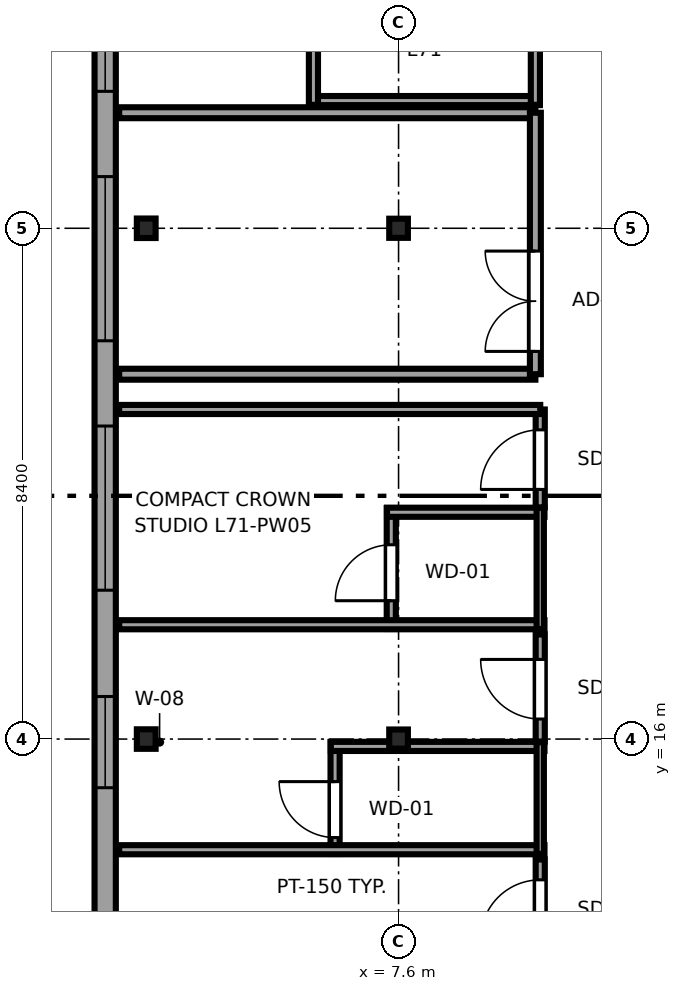
"""IFC4 building model, lengths in metres.
Left out: names, types, materials, properties, quantities, classifications, styles, units other than length and angle.
Written with IfcOpenShell. Run it as: python <this file> out.ifc"""

import sys

from ifc_helpers import new_model, si_unit, direction, frame, frame_2d, origin, origin_2d, place, context, subcontext, project, spatial, rectangle, i_section, extrude, source, transform, mapped, element, fill, save


model = new_model("IFC4")
c1 = context("Model", 3, precision=1e-05, world=origin(), true_north=direction((0.0, 1.0)))
c2 = subcontext(c1, "Body", "Model", "MODEL_VIEW")
j1 = project(units=[si_unit("LENGTHUNIT", "METRE"), si_unit("PLANEANGLEUNIT", "RADIAN")], contexts=[c1])
p1 = place(None, origin())
s1 = spatial("IfcSite", under=j1, at=p1, CompositionType="ELEMENT")
p2 = place(p1, origin())
s2 = spatial("IfcBuilding", under=s1, at=p2, CompositionType="ELEMENT")
p3 = place(p2, frame((0.0, 0.0, 266.5)))
s3 = spatial("IfcBuildingStorey", under=s2, at=p3, CompositionType="ELEMENT", Elevation=266.5)
m1 = source(origin(), c2, "Body", "SweptSolid", [
    extrude(i_section(OverallWidth=0.309, OverallDepth=0.321, WebThickness=0.014, FlangeThickness=0.022, FilletRadius=0.017, at=origin_2d()), origin(), (0.0, 0.0, 1.0), 3.55),
])
p4 = place(p3, frame((3.45, 16.0, 0.0), z_axis=(0.0, 0.0, 1.0), x_axis=(1.0, 0.0, 0.0)))
e1 = element("IfcColumn", 1, at=p4, inside=s3, PredefinedType="COLUMN", context=c2, shape_type="MappedRepresentation", body=[
    mapped(m1, transform((0.0, 0.0, 0.0), x_axis=(1.0, 0.0, 0.0), y_axis=(0.0, 1.0, 0.0), z_axis=(0.0, 0.0, 1.0), scale=1.0)),
])
m2 = source(origin(), c2, "Body", "SweptSolid", [
    extrude(i_section(OverallWidth=0.307, OverallDepth=0.315, WebThickness=0.012, FlangeThickness=0.019, FilletRadius=0.017, at=origin_2d()), origin(), (0.0, 0.0, 1.0), 3.55),
])
p5 = place(p3, frame((7.6, 16.0, 0.0), z_axis=(0.0, 0.0, 1.0), x_axis=(1.0, 0.0, 0.0)))
e2 = element("IfcColumn", 2, at=p5, inside=s3, PredefinedType="COLUMN", context=c2, shape_type="MappedRepresentation", body=[
    mapped(m2, transform((0.0, 0.0, 0.0), x_axis=(1.0, 0.0, 0.0), y_axis=(0.0, 1.0, 0.0), z_axis=(0.0, 0.0, 1.0), scale=1.0)),
])
p6 = place(p3, frame((3.45, 24.4, 0.0), z_axis=(0.0, 0.0, 1.0), x_axis=(1.0, 0.0, 0.0)))
e3 = element("IfcColumn", 3, at=p6, inside=s3, PredefinedType="COLUMN", context=c2, shape_type="MappedRepresentation", body=[
    mapped(m1, transform((0.0, 0.0, 0.0), x_axis=(1.0, 0.0, 0.0), y_axis=(0.0, 1.0, 0.0), z_axis=(0.0, 0.0, 1.0), scale=1.0)),
])
p7 = place(p3, frame((7.6, 24.4, 0.0), z_axis=(0.0, 0.0, 1.0), x_axis=(1.0, 0.0, 0.0)))
e4 = element("IfcColumn", 4, at=p7, inside=s3, PredefinedType="COLUMN", context=c2, shape_type="MappedRepresentation", body=[
    mapped(m2, transform((0.0, 0.0, 0.0), x_axis=(1.0, 0.0, 0.0), y_axis=(0.0, 1.0, 0.0), z_axis=(0.0, 0.0, 1.0), scale=1.0)),
])
p8 = place(p3, frame((2.775, 40.783, 0.0), z_axis=(0.0, 0.0, 1.0), x_axis=(0.0, -1.0, 0.0)))
e5 = element("IfcWall", 5, at=p8, inside=s3, PredefinedType="SOLIDWALL", context=c2, shape_type="SweptSolid", body=[
    extrude(rectangle(XDim=33.766, YDim=0.35, at=frame_2d((16.883, 0.0))), origin(), (0.0, 0.0, 1.0), 3.25),
])
p9 = place(p8, frame((5.678, 0.0, 0.68)))
e6 = element("IfcOpeningElement", 6, at=p9, cuts=e5, PredefinedType="OPENING", context=c2, shape_type="SweptSolid", body=[
    extrude(rectangle(XDim=2.7, YDim=1.95, at=frame_2d((1.35, 0.975))), frame((0.0, 0.185, 0.0), z_axis=(0.0, -1.0, 0.0), x_axis=(1.0, 0.0, 0.0)), (0.0, 0.0, 1.0), 0.37),
])
p10 = place(p8, frame((11.431, 0.0, 0.68)))
e7 = element("IfcOpeningElement", 7, at=p10, cuts=e5, PredefinedType="OPENING", context=c2, shape_type="SweptSolid", body=[
    extrude(rectangle(XDim=2.7, YDim=1.95, at=frame_2d((1.35, 0.975))), frame((0.0, 0.185, 0.0), z_axis=(0.0, -1.0, 0.0), x_axis=(1.0, 0.0, 0.0)), (0.0, 0.0, 1.0), 0.37),
])
p11 = place(p8, frame((15.533, 0.0, 0.68)))
e8 = element("IfcOpeningElement", 8, at=p11, cuts=e5, PredefinedType="OPENING", context=c2, shape_type="SweptSolid", body=[
    extrude(rectangle(XDim=2.7, YDim=1.95, at=frame_2d((1.35, 0.975))), frame((0.0, 0.185, 0.0), z_axis=(0.0, -1.0, 0.0), x_axis=(1.0, 0.0, 0.0)), (0.0, 0.0, 1.0), 0.37),
])
p12 = place(p8, frame((19.635, 0.0, 0.68)))
e9 = element("IfcOpeningElement", 9, at=p12, cuts=e5, PredefinedType="OPENING", context=c2, shape_type="SweptSolid", body=[
    extrude(rectangle(XDim=2.7, YDim=1.95, at=frame_2d((1.35, 0.975))), frame((0.0, 0.185, 0.0), z_axis=(0.0, -1.0, 0.0), x_axis=(1.0, 0.0, 0.0)), (0.0, 0.0, 1.0), 0.37),
])
p13 = place(p8, frame((31.279, 0.0, 0.62)))
e10 = element("IfcOpeningElement", 10, at=p13, cuts=e5, PredefinedType="OPENING", context=c2, shape_type="SweptSolid", body=[
    extrude(rectangle(XDim=1.5, YDim=1.55, at=frame_2d((0.75, 0.775))), frame((0.0, 0.185, 0.0), z_axis=(0.0, -1.0, 0.0), x_axis=(1.0, 0.0, 0.0)), (0.0, 0.0, 1.0), 0.37),
])
p14 = place(p8, frame((27.783, 0.0, 0.62)))
e11 = element("IfcOpeningElement", 11, at=p14, cuts=e5, PredefinedType="OPENING", context=c2, shape_type="SweptSolid", body=[
    extrude(rectangle(XDim=1.5, YDim=1.55, at=frame_2d((0.75, 0.775))), frame((0.0, 0.185, 0.0), z_axis=(0.0, -1.0, 0.0), x_axis=(1.0, 0.0, 0.0)), (0.0, 0.0, 1.0), 0.37),
])
p15 = place(p8, frame((24.083, 0.0, 0.62)))
e12 = element("IfcOpeningElement", 12, at=p15, cuts=e5, PredefinedType="OPENING", context=c2, shape_type="SweptSolid", body=[
    extrude(rectangle(XDim=1.5, YDim=1.55, at=frame_2d((0.75, 0.775))), frame((0.0, 0.185, 0.0), z_axis=(0.0, -1.0, 0.0), x_axis=(1.0, 0.0, 0.0)), (0.0, 0.0, 1.0), 0.37),
])
p16 = place(p8, frame((0.586, 0.0, 0.62)))
e13 = element("IfcOpeningElement", 13, at=p16, cuts=e5, PredefinedType="OPENING", context=c2, shape_type="SweptSolid", body=[
    extrude(rectangle(XDim=1.5, YDim=1.55, at=frame_2d((0.75, 0.775))), frame((0.0, 0.185, 0.0), z_axis=(0.0, -1.0, 0.0), x_axis=(1.0, 0.0, 0.0)), (0.0, 0.0, 1.0), 0.37),
])
p17 = place(p3, frame((6.556, 14.11, 0.0), z_axis=(0.0, 0.0, 1.0), x_axis=(0.0, 1.0, 0.0)))
e14 = element("IfcWall", 14, at=p17, inside=s3, PredefinedType="PARTITIONING", context=c2, shape_type="SweptSolid", body=[
    extrude(rectangle(XDim=1.839, YDim=0.15, at=frame_2d((0.919, 0.0))), origin(), (0.0, 0.0, 1.0), 3.25),
])
p18 = place(p17, frame((0.27, 0.0, 0.0)))
e15 = element("IfcOpeningElement", 15, at=p18, cuts=e14, PredefinedType="OPENING", context=c2, shape_type="SweptSolid", body=[
    extrude(rectangle(XDim=0.92, YDim=2.01, at=frame_2d((0.46, 1.005))), frame((0.0, 0.085, 0.0), z_axis=(0.0, -1.0, 0.0), x_axis=(1.0, 0.0, 0.0)), (0.0, 0.0, 1.0), 0.17),
])
p19 = place(p3, frame((3.005, 14.18, 0.0), z_axis=(0.0, 0.0, 1.0), x_axis=(1.0, 0.0, 0.0)))
e16 = element("IfcWall", 16, at=p19, inside=s3, PredefinedType="PARTITIONING", context=c2, shape_type="SweptSolid", body=[
    extrude(rectangle(XDim=6.995, YDim=0.15, at=frame_2d((3.498, 0.0))), origin(), (0.0, 0.0, 1.0), 3.25),
])
p20 = place(p3, frame((6.486, 15.879, 0.0), z_axis=(0.0, 0.0, 1.0), x_axis=(1.0, 0.0, 0.0)))
e17 = element("IfcWall", 17, at=p20, inside=s3, PredefinedType="PARTITIONING", context=c2, shape_type="SweptSolid", body=[
    extrude(rectangle(XDim=3.514, YDim=0.15, at=frame_2d((1.757, 0.0))), origin(), (0.0, 0.0, 1.0), 2.04),
])
p21 = place(p3, frame((9.93, 14.11, 0.0), z_axis=(0.0, 0.0, 1.0), x_axis=(0.0, 1.0, 0.0)))
e18 = element("IfcWall", 18, at=p21, inside=s3, PredefinedType="PLUMBINGWALL", context=c2, shape_type="SweptSolid", body=[
    extrude(rectangle(XDim=1.839, YDim=0.12, at=frame_2d((0.919, 0.0))), origin(), (0.0, 0.0, 1.0), 3.25),
])
p22 = place(p3, frame((7.48, 17.81, 0.0), z_axis=(0.0, 0.0, 1.0), x_axis=(0.0, 1.0, 0.0)))
e19 = element("IfcWall", 19, at=p22, inside=s3, PredefinedType="PARTITIONING", context=c2, shape_type="SweptSolid", body=[
    extrude(rectangle(XDim=1.99, YDim=0.15, at=frame_2d((0.995, 0.0))), origin(), (0.0, 0.0, 1.0), 2.04),
])
p23 = place(p22, frame((0.465, 0.0, 0.0)))
e20 = element("IfcOpeningElement", 20, at=p23, cuts=e19, PredefinedType="OPENING", context=c2, shape_type="SweptSolid", body=[
    extrude(rectangle(XDim=0.92, YDim=2.01, at=frame_2d((0.46, 1.005))), frame((0.0, 0.085, 0.0), z_axis=(0.0, -1.0, 0.0), x_axis=(1.0, 0.0, 0.0)), (0.0, 0.0, 1.0), 0.17),
])
p24 = place(p3, frame((3.005, 17.88, 0.0), z_axis=(0.0, 0.0, 1.0), x_axis=(1.0, 0.0, 0.0)))
e21 = element("IfcWall", 21, at=p24, inside=s3, PredefinedType="PARTITIONING", context=c2, shape_type="SweptSolid", body=[
    extrude(rectangle(XDim=6.995, YDim=0.15, at=frame_2d((3.498, 0.0))), origin(), (0.0, 0.0, 1.0), 3.25),
])
p25 = place(p3, frame((7.41, 19.73, 0.0), z_axis=(0.0, 0.0, 1.0), x_axis=(1.0, 0.0, 0.0)))
e22 = element("IfcWall", 22, at=p25, inside=s3, PredefinedType="PARTITIONING", context=c2, shape_type="SweptSolid", body=[
    extrude(rectangle(XDim=2.59, YDim=0.15, at=frame_2d((1.295, 0.0))), origin(), (0.0, 0.0, 1.0), 3.25),
])
p26 = place(p3, frame((9.93, 17.81, 0.0), z_axis=(0.0, 0.0, 1.0), x_axis=(0.0, 1.0, 0.0)))
e23 = element("IfcWall", 23, at=p26, inside=s3, PredefinedType="PLUMBINGWALL", context=c2, shape_type="SweptSolid", body=[
    extrude(rectangle(XDim=1.99, YDim=0.12, at=frame_2d((0.995, 0.0))), origin(), (0.0, 0.0, 1.0), 3.25),
])
p27 = place(p3, frame((9.93, 12.41, 0.0), z_axis=(0.0, 0.0, 1.0), x_axis=(0.0, 1.0, 0.0)))
e24 = element("IfcWall", 24, at=p27, inside=s3, PredefinedType="PARTITIONING", context=c2, shape_type="SweptSolid", body=[
    extrude(rectangle(XDim=1.61, YDim=0.15, at=frame_2d((0.805, 0.0))), origin(), (0.0, 0.0, 1.0), 3.25),
])
p28 = place(p27, frame((0.295, 0.0, 0.0)))
e25 = element("IfcOpeningElement", 25, at=p28, cuts=e24, PredefinedType="OPENING", context=c2, shape_type="SweptSolid", body=[
    extrude(rectangle(XDim=0.98, YDim=2.12, at=frame_2d((0.49, 1.06))), frame((0.0, 0.085, 0.0), z_axis=(0.0, -1.0, 0.0), x_axis=(1.0, 0.0, 0.0)), (0.0, 0.0, 1.0), 0.17),
])
p29 = place(p3, frame((9.93, 15.959, 0.0), z_axis=(0.0, 0.0, 1.0), x_axis=(0.0, 1.0, 0.0)))
e26 = element("IfcWall", 26, at=p29, inside=s3, PredefinedType="PARTITIONING", context=c2, shape_type="SweptSolid", body=[
    extrude(rectangle(XDim=1.761, YDim=0.15, at=frame_2d((0.88, 0.0))), origin(), (0.0, 0.0, 1.0), 3.25),
])
p30 = place(p29, frame((0.371, 0.0, 0.0)))
e27 = element("IfcOpeningElement", 27, at=p30, cuts=e26, PredefinedType="OPENING", context=c2, shape_type="SweptSolid", body=[
    extrude(rectangle(XDim=0.98, YDim=2.12, at=frame_2d((0.49, 1.06))), frame((0.0, 0.085, 0.0), z_axis=(0.0, -1.0, 0.0), x_axis=(1.0, 0.0, 0.0)), (0.0, 0.0, 1.0), 0.17),
])
p31 = place(p3, frame((9.93, 19.81, 0.0), z_axis=(0.0, 0.0, 1.0), x_axis=(0.0, 1.0, 0.0)))
e28 = element("IfcWall", 28, at=p31, inside=s3, PredefinedType="PARTITIONING", context=c2, shape_type="SweptSolid", body=[
    extrude(rectangle(XDim=1.61, YDim=0.15, at=frame_2d((0.805, 0.0))), origin(), (0.0, 0.0, 1.0), 3.25),
])
p32 = place(p31, frame((0.295, 0.0, 0.0)))
e29 = element("IfcOpeningElement", 29, at=p32, cuts=e28, PredefinedType="OPENING", context=c2, shape_type="SweptSolid", body=[
    extrude(rectangle(XDim=0.98, YDim=2.12, at=frame_2d((0.49, 1.06))), frame((0.0, 0.085, 0.0), z_axis=(0.0, -1.0, 0.0), x_axis=(1.0, 0.0, 0.0)), (0.0, 0.0, 1.0), 0.17),
])
p33 = place(p3, frame((3.005, 21.42, 0.0), z_axis=(0.0, 0.0, 1.0), x_axis=(1.0, 0.0, 0.0)))
e30 = element("IfcWall", 30, at=p33, inside=s3, PredefinedType="PARTITIONING", context=c2, shape_type="SweptSolid", body=[
    extrude(rectangle(XDim=6.925, YDim=0.15, at=frame_2d((3.462, 0.0))), origin(), (0.0, 0.0, 1.0), 3.25),
])
for number, where, z_axis, x_axis in (
    (31, (3.005, 22.0, 0.0), (0.0, 0.0, 1.0), (1.0, 0.0, 0.0)),
    (32, (3.005, 26.3, 0.0), (0.0, 0.0, 1.0), (1.0, 0.0, 0.0)),
):
    element("IfcWall", number, at=place(p3, frame(where, z_axis=z_axis, x_axis=x_axis)), inside=s3, PredefinedType="PARTITIONING", context=c2, shape_type="SweptSolid", body=[
        extrude(rectangle(XDim=6.845, YDim=0.18, at=frame_2d((3.423, 0.0))), origin(), (0.0, 0.0, 1.0), 3.25),
    ])
p34 = place(p3, frame((9.85, 22.0, 0.0), z_axis=(0.0, 0.0, 1.0), x_axis=(0.0, 1.0, 0.0)))
e33 = element("IfcWall", 33, at=p34, inside=s3, PredefinedType="PARTITIONING", context=c2, shape_type="SweptSolid", body=[
    extrude(rectangle(XDim=4.3, YDim=0.18, at=frame_2d((2.15, 0.0))), origin(), (0.0, 0.0, 1.0), 3.25),
])
p35 = place(p34, frame((0.375, 0.0, 0.0)))
e34 = element("IfcOpeningElement", 34, at=p35, cuts=e33, PredefinedType="OPENING", context=c2, shape_type="SweptSolid", body=[
    extrude(rectangle(XDim=1.65, YDim=2.15, at=frame_2d((0.825, 1.075))), frame((0.0, 0.1, 0.0), z_axis=(0.0, -1.0, 0.0), x_axis=(1.0, 0.0, 0.0)), (0.0, 0.0, 1.0), 0.2),
])
p36 = place(p3, frame((6.13, 26.5, 0.0), z_axis=(0.0, 0.0, 1.0), x_axis=(1.0, 0.0, 0.0)))
e35 = element("IfcWall", 35, at=p36, inside=s3, PredefinedType="PARTITIONING", context=c2, shape_type="SweptSolid", body=[
    extrude(rectangle(XDim=3.79, YDim=0.15, at=frame_2d((1.895, 0.0))), origin(), (0.0, 0.0, 1.0), 3.25),
])
for number, where, z_axis, x_axis in (
    (36, (6.2, 26.43, 0.0), (0.0, 0.0, 1.0), (0.0, 1.0, 0.0)),
    (37, (9.85, 26.43, 0.0), (0.0, 0.0, 1.0), (0.0, 1.0, 0.0)),
):
    element("IfcWall", number, at=place(p3, frame(where, z_axis=z_axis, x_axis=x_axis)), inside=s3, PredefinedType="PARTITIONING", context=c2, shape_type="SweptSolid", body=[
        extrude(rectangle(XDim=3.34, YDim=0.15, at=frame_2d((1.67, 0.0))), origin(), (0.0, 0.0, 1.0), 3.25),
    ])
m3 = source(origin(), c2, "Body", "SweptSolid", [
    extrude(rectangle(XDim=2.7, YDim=1.95, at=frame_2d((1.35, 0.975))), frame((0.0, 0.09, 0.0), z_axis=(0.0, -1.0, 0.0), x_axis=(1.0, 0.0, 0.0)), (0.0, 0.0, 1.0), 0.06),
])
p37 = place(p10, origin())
e38 = element("IfcWindow", 38, at=p37, inside=s3, PartitioningType="TRIPLE_PANEL_HORIZONTAL", PredefinedType="WINDOW", context=c2, shape_type="MappedRepresentation", body=[
    mapped(m3, transform((0.0, 0.0, 0.0), x_axis=(1.0, 0.0, 0.0), y_axis=(0.0, 1.0, 0.0), z_axis=(0.0, 0.0, 1.0), scale=1.0)),
])
fill(e7, e38)
p38 = place(p11, origin())
e39 = element("IfcWindow", 39, at=p38, inside=s3, PartitioningType="TRIPLE_PANEL_HORIZONTAL", PredefinedType="WINDOW", context=c2, shape_type="MappedRepresentation", body=[
    mapped(m3, transform((0.0, 0.0, 0.0), x_axis=(1.0, 0.0, 0.0), y_axis=(0.0, 1.0, 0.0), z_axis=(0.0, 0.0, 1.0), scale=1.0)),
])
fill(e8, e39)
p39 = place(p12, origin())
e40 = element("IfcWindow", 40, at=p39, inside=s3, PartitioningType="TRIPLE_PANEL_HORIZONTAL", PredefinedType="WINDOW", context=c2, shape_type="MappedRepresentation", body=[
    mapped(m3, transform((0.0, 0.0, 0.0), x_axis=(1.0, 0.0, 0.0), y_axis=(0.0, 1.0, 0.0), z_axis=(0.0, 0.0, 1.0), scale=1.0)),
])
fill(e9, e40)
m4 = source(origin(), c2, "Body", "SweptSolid", [
    extrude(rectangle(XDim=1.5, YDim=1.55, at=frame_2d((0.75, 0.775))), frame((0.0, 0.09, 0.0), z_axis=(0.0, -1.0, 0.0), x_axis=(1.0, 0.0, 0.0)), (0.0, 0.0, 1.0), 0.06),
])
p40 = place(p15, origin())
e41 = element("IfcWindow", 41, at=p40, inside=s3, PartitioningType="SINGLE_PANEL", PredefinedType="WINDOW", context=c2, shape_type="MappedRepresentation", body=[
    mapped(m4, transform((0.0, 0.0, 0.0), x_axis=(1.0, 0.0, 0.0), y_axis=(0.0, 1.0, 0.0), z_axis=(0.0, 0.0, 1.0), scale=1.0)),
])
fill(e12, e41)
m5 = source(origin(), c2, "Body", "SweptSolid", [
    extrude(rectangle(XDim=0.92, YDim=2.01, at=frame_2d((0.46, 1.005))), frame((0.0, 0.025, 0.0), z_axis=(0.0, -1.0, 0.0), x_axis=(1.0, 0.0, 0.0)), (0.0, 0.0, 1.0), 0.05),
])
p41 = place(p18, origin())
e42 = element("IfcDoor", 42, at=p41, inside=s3, OperationType="SINGLE_SWING_RIGHT", PredefinedType="DOOR", context=c2, shape_type="MappedRepresentation", body=[
    mapped(m5, transform((0.0, 0.0, 0.0), x_axis=(1.0, 0.0, 0.0), y_axis=(0.0, 1.0, 0.0), z_axis=(0.0, 0.0, 1.0), scale=1.0)),
])
fill(e15, e42)
p42 = place(p23, origin())
e43 = element("IfcDoor", 43, at=p42, inside=s3, OperationType="SINGLE_SWING_LEFT", PredefinedType="DOOR", context=c2, shape_type="MappedRepresentation", body=[
    mapped(m5, transform((0.0, 0.0, 0.0), x_axis=(1.0, 0.0, 0.0), y_axis=(0.0, 1.0, 0.0), z_axis=(0.0, 0.0, 1.0), scale=1.0)),
])
fill(e20, e43)
m6 = source(origin(), c2, "Body", "SweptSolid", [
    extrude(rectangle(XDim=0.98, YDim=2.12, at=frame_2d((0.49, 1.06))), frame((0.0, 0.025, 0.0), z_axis=(0.0, -1.0, 0.0), x_axis=(1.0, 0.0, 0.0)), (0.0, 0.0, 1.0), 0.05),
])
p43 = place(p28, origin())
e44 = element("IfcDoor", 44, at=p43, inside=s3, OperationType="SINGLE_SWING_LEFT", PredefinedType="DOOR", context=c2, shape_type="MappedRepresentation", body=[
    mapped(m6, transform((0.0, 0.0, 0.0), x_axis=(1.0, 0.0, 0.0), y_axis=(0.0, 1.0, 0.0), z_axis=(0.0, 0.0, 1.0), scale=1.0)),
])
fill(e25, e44)
p44 = place(p30, origin())
e45 = element("IfcDoor", 45, at=p44, inside=s3, OperationType="SINGLE_SWING_RIGHT", PredefinedType="DOOR", context=c2, shape_type="MappedRepresentation", body=[
    mapped(m6, transform((0.0, 0.0, 0.0), x_axis=(1.0, 0.0, 0.0), y_axis=(0.0, 1.0, 0.0), z_axis=(0.0, 0.0, 1.0), scale=1.0)),
])
fill(e27, e45)
p45 = place(p32, origin())
e46 = element("IfcDoor", 46, at=p45, inside=s3, OperationType="SINGLE_SWING_LEFT", PredefinedType="DOOR", context=c2, shape_type="MappedRepresentation", body=[
    mapped(m6, transform((0.0, 0.0, 0.0), x_axis=(1.0, 0.0, 0.0), y_axis=(0.0, 1.0, 0.0), z_axis=(0.0, 0.0, 1.0), scale=1.0)),
])
fill(e29, e46)
m7 = source(origin(), c2, "Body", "SweptSolid", [
    extrude(rectangle(XDim=1.65, YDim=2.15, at=frame_2d((0.825, 1.075))), frame((0.0, 0.025, 0.0), z_axis=(0.0, -1.0, 0.0), x_axis=(1.0, 0.0, 0.0)), (0.0, 0.0, 1.0), 0.05),
])
p46 = place(p35, origin())
e47 = element("IfcDoor", 47, at=p46, inside=s3, OperationType="DOUBLE_DOOR_SINGLE_SWING", PredefinedType="DOOR", context=c2, shape_type="MappedRepresentation", body=[
    mapped(m7, transform((0.0, 0.0, 0.0), x_axis=(1.0, 0.0, 0.0), y_axis=(0.0, 1.0, 0.0), z_axis=(0.0, 0.0, 1.0), scale=1.0)),
])
fill(e34, e47)
save(model, sys.argv[1])
